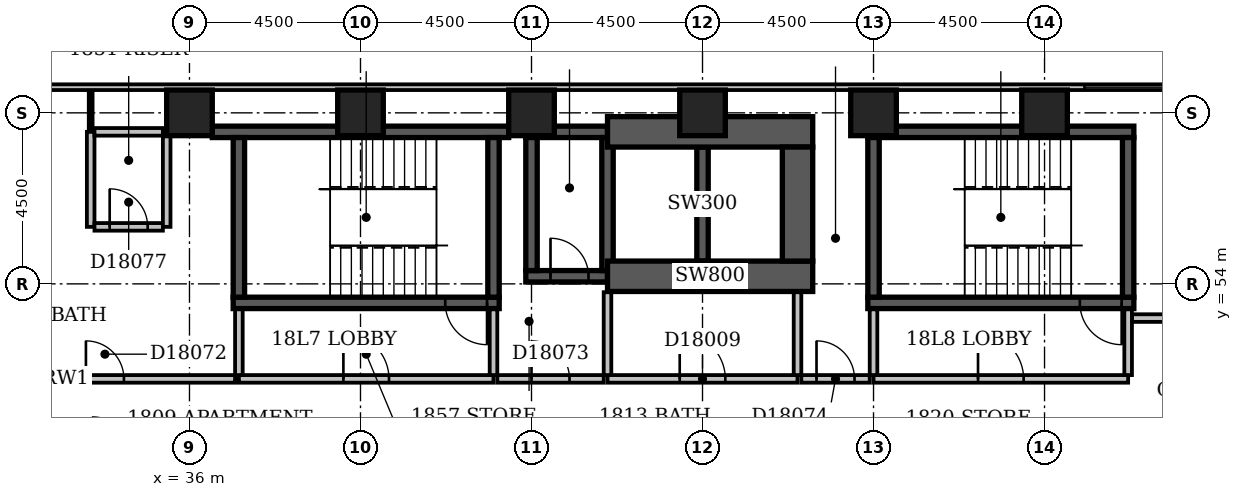
"""IFC4 building model, lengths in metres.
Left out: names, types, materials, properties, quantities, classifications, styles, units other than length and angle.
Written with IfcOpenShell. Run it as: python <this file> out.ifc"""

import sys

from ifc_helpers import new_model, si_unit, direction, frame, frame_2d, origin, origin_2d, place, context, subcontext, project, spatial, rectangle, extrude, element, fill, save


model = new_model("IFC4")
c1 = context("Model", 3, precision=1e-05, world=origin(), true_north=direction((0.0, 1.0)))
c2 = subcontext(c1, "Body", "Model", "MODEL_VIEW")
j1 = project(units=[si_unit("LENGTHUNIT", "METRE"), si_unit("PLANEANGLEUNIT", "RADIAN")], contexts=[c1])
p1 = place(None, origin())
s1 = spatial("IfcSite", under=j1, at=p1, CompositionType="ELEMENT")
p2 = place(p1, origin())
s2 = spatial("IfcBuilding", under=s1, at=p2, CompositionType="ELEMENT")
p3 = place(p2, frame((0.0, 0.0, 75.8)))
s3 = spatial("IfcBuildingStorey", under=s2, at=p3, CompositionType="ELEMENT", Elevation=75.8)
p4 = place(p3, frame((36.6, 58.0, -0.3), z_axis=(0.0, 0.0, 1.0), x_axis=(1.0, 0.0, 0.0)))
e1 = element("IfcWall", 1, at=p4, inside=s3, PredefinedType="SHEAR", context=c2, shape_type="SweptSolid", body=[
    extrude(rectangle(XDim=7.8, YDim=0.3, at=frame_2d((3.9, 0.0))), origin(), (0.0, 0.0, 1.0), 3.6),
])
p5 = place(p3, frame((37.15, 53.5, -0.3), z_axis=(0.0, 0.0, 1.0), x_axis=(1.0, 0.0, 0.0)))
e2 = element("IfcWall", 2, at=p5, inside=s3, PredefinedType="SHEAR", context=c2, shape_type="SweptSolid", body=[
    extrude(rectangle(XDim=7.0, YDim=0.3, at=frame_2d((3.5, 0.0))), origin(), (0.0, 0.0, 1.0), 3.6),
])
p6 = place(p5, frame((5.58, 0.0, 0.3)))
e3 = element("IfcOpeningElement", 3, at=p6, cuts=e2, PredefinedType="OPENING", context=c2, shape_type="SweptSolid", body=[
    extrude(rectangle(XDim=1.1, YDim=2.1, at=frame_2d((0.55, 1.05))), frame((0.0, 0.162, 0.0), z_axis=(0.0, -1.0, 0.0), x_axis=(1.0, 0.0, 0.0)), (0.0, 0.0, 1.0), 0.324),
])
for number, where, z_axis, x_axis in (
    (4, (37.3, 53.65, -0.3), (0.0, 0.0, 1.0), (0.0, 1.0, 0.0)),
    (5, (44.0, 53.65, -0.3), (0.0, 0.0, 1.0), (0.0, 1.0, 0.0)),
):
    element("IfcWall", number, at=place(p3, frame(where, z_axis=z_axis, x_axis=x_axis)), inside=s3, PredefinedType="SHEAR", context=c2, shape_type="SweptSolid", body=[
        extrude(rectangle(XDim=4.2, YDim=0.3, at=frame_2d((2.1, 0.0))), origin(), (0.0, 0.0, 1.0), 3.6),
    ])
p7 = place(p3, frame((44.85, 54.2, -0.3), z_axis=(0.0, 0.0, 1.0), x_axis=(1.0, 0.0, 0.0)))
e6 = element("IfcWall", 6, at=p7, inside=s3, PredefinedType="SHEAR", context=c2, shape_type="SweptSolid", body=[
    extrude(rectangle(XDim=2.15, YDim=0.3, at=frame_2d((1.075, 0.0))), origin(), (0.0, 0.0, 1.0), 3.6),
])
p8 = place(p7, frame((0.65, 0.0, 0.3)))
e7 = element("IfcOpeningElement", 7, at=p8, cuts=e6, PredefinedType="OPENING", context=c2, shape_type="SweptSolid", body=[
    extrude(rectangle(XDim=1.0, YDim=2.1, at=frame_2d((0.5, 1.05))), frame((0.0, 0.162, 0.0), z_axis=(0.0, -1.0, 0.0), x_axis=(1.0, 0.0, 0.0)), (0.0, 0.0, 1.0), 0.324),
])
p9 = place(p3, frame((44.85, 58.0, -0.3), z_axis=(0.0, 0.0, 1.0), x_axis=(1.0, 0.0, 0.0)))
e8 = element("IfcWall", 8, at=p9, inside=s3, PredefinedType="SHEAR", context=c2, shape_type="SweptSolid", body=[
    extrude(rectangle(XDim=2.15, YDim=0.3, at=frame_2d((1.075, 0.0))), origin(), (0.0, 0.0, 1.0), 3.6),
])
p10 = place(p3, frame((45.0, 54.35, -0.3), z_axis=(0.0, 0.0, 1.0), x_axis=(0.0, 1.0, 0.0)))
e9 = element("IfcWall", 9, at=p10, inside=s3, PredefinedType="SHEAR", context=c2, shape_type="SweptSolid", body=[
    extrude(rectangle(XDim=3.5, YDim=0.3, at=frame_2d((1.75, 0.0))), origin(), (0.0, 0.0, 1.0), 3.6),
])
p11 = place(p3, frame((47.0, 54.2, -0.3), z_axis=(0.0, 0.0, 1.0), x_axis=(1.0, 0.0, 0.0)))
e10 = element("IfcWall", 10, at=p11, inside=s3, PredefinedType="SHEAR", context=c2, shape_type="SweptSolid", body=[
    extrude(rectangle(XDim=5.4, YDim=0.8, at=frame_2d((2.7, 0.0))), origin(), (0.0, 0.0, 1.0), 3.6),
])
p12 = place(p3, frame((47.0, 54.35, -0.3), z_axis=(0.0, 0.0, 1.0), x_axis=(0.0, 1.0, 0.0)))
e11 = element("IfcWall", 11, at=p12, inside=s3, PredefinedType="SHEAR", context=c2, shape_type="SweptSolid", body=[
    extrude(rectangle(XDim=3.5, YDim=0.3, at=frame_2d((1.75, 0.0))), origin(), (0.0, 0.0, 1.0), 3.6),
])
p13 = place(p3, frame((47.0, 58.0, -0.3), z_axis=(0.0, 0.0, 1.0), x_axis=(1.0, 0.0, 0.0)))
e12 = element("IfcWall", 12, at=p13, inside=s3, PredefinedType="SHEAR", context=c2, shape_type="SweptSolid", body=[
    extrude(rectangle(XDim=5.4, YDim=0.8, at=frame_2d((2.7, 0.0))), origin(), (0.0, 0.0, 1.0), 3.6),
])
p14 = place(p3, frame((49.5, 54.6, -0.3), z_axis=(0.0, 0.0, 1.0), x_axis=(0.0, 1.0, 0.0)))
e13 = element("IfcWall", 13, at=p14, inside=s3, PredefinedType="SHEAR", context=c2, shape_type="SweptSolid", body=[
    extrude(rectangle(XDim=3.0, YDim=0.3, at=frame_2d((1.5, 0.0))), origin(), (0.0, 0.0, 1.0), 3.6),
])
p15 = place(p3, frame((52.0, 54.6, -0.3), z_axis=(0.0, 0.0, 1.0), x_axis=(0.0, 1.0, 0.0)))
e14 = element("IfcWall", 14, at=p15, inside=s3, PredefinedType="SHEAR", context=c2, shape_type="SweptSolid", body=[
    extrude(rectangle(XDim=3.0, YDim=0.8, at=frame_2d((1.5, 0.0))), origin(), (0.0, 0.0, 1.0), 3.6),
])
p16 = place(p3, frame((53.85, 53.5, -0.3), z_axis=(0.0, 0.0, 1.0), x_axis=(1.0, 0.0, 0.0)))
e15 = element("IfcWall", 15, at=p16, inside=s3, PredefinedType="SHEAR", context=c2, shape_type="SweptSolid", body=[
    extrude(rectangle(XDim=7.0, YDim=0.3, at=frame_2d((3.5, 0.0))), origin(), (0.0, 0.0, 1.0), 3.6),
])
p17 = place(p16, frame((5.58, 0.0, 0.3)))
e16 = element("IfcOpeningElement", 16, at=p17, cuts=e15, PredefinedType="OPENING", context=c2, shape_type="SweptSolid", body=[
    extrude(rectangle(XDim=1.1, YDim=2.1, at=frame_2d((0.55, 1.05))), frame((0.0, 0.162, 0.0), z_axis=(0.0, -1.0, 0.0), x_axis=(1.0, 0.0, 0.0)), (0.0, 0.0, 1.0), 0.324),
])
p18 = place(p3, frame((53.85, 58.0, -0.3), z_axis=(0.0, 0.0, 1.0), x_axis=(1.0, 0.0, 0.0)))
e17 = element("IfcWall", 17, at=p18, inside=s3, PredefinedType="SHEAR", context=c2, shape_type="SweptSolid", body=[
    extrude(rectangle(XDim=7.0, YDim=0.3, at=frame_2d((3.5, 0.0))), origin(), (0.0, 0.0, 1.0), 3.6),
])
for number, where, z_axis, x_axis in (
    (18, (54.0, 53.65, -0.3), (0.0, 0.0, 1.0), (0.0, 1.0, 0.0)),
    (19, (60.7, 53.65, -0.3), (0.0, 0.0, 1.0), (0.0, 1.0, 0.0)),
):
    element("IfcWall", number, at=place(p3, frame(where, z_axis=z_axis, x_axis=x_axis)), inside=s3, PredefinedType="SHEAR", context=c2, shape_type="SweptSolid", body=[
        extrude(rectangle(XDim=4.2, YDim=0.3, at=frame_2d((2.1, 0.0))), origin(), (0.0, 0.0, 1.0), 3.6),
    ])
for number, where, z_axis, x_axis in (
    (20, (36.0, 58.5, -0.3), (0.0, 0.0, 1.0), (1.0, 0.0, 0.0)),
    (21, (40.5, 58.5, -0.3), (0.0, 0.0, 1.0), (1.0, 0.0, 0.0)),
    (22, (45.0, 58.5, -0.3), (0.0, 0.0, 1.0), (1.0, 0.0, 0.0)),
    (23, (49.5, 58.5, -0.3), (0.0, 0.0, 1.0), (1.0, 0.0, 0.0)),
    (24, (54.0, 58.5, -0.3), (0.0, 0.0, 1.0), (1.0, 0.0, 0.0)),
    (25, (58.5, 58.5, -0.3), (0.0, 0.0, 1.0), (1.0, 0.0, 0.0)),
):
    element("IfcColumn", number, at=place(p3, frame(where, z_axis=z_axis, x_axis=x_axis)), inside=s3, PredefinedType="COLUMN", context=c2, shape_type="SweptSolid", body=[
        extrude(rectangle(XDim=1.2, YDim=1.2, at=origin_2d()), origin(), (0.0, 0.0, 1.0), 3.6),
    ])
p19 = place(p3, frame((68.1, 59.175, 0.0), z_axis=(0.0, 0.0, 1.0), x_axis=(-1.0, 0.0, 0.0)))
e26 = element("IfcWall", 26, at=p19, inside=s3, PredefinedType="STANDARD", context=c2, shape_type="SweptSolid", body=[
    extrude(rectangle(XDim=68.85, YDim=0.15, at=frame_2d((34.425, 0.0))), origin(), (0.0, 0.0, 1.0), 2.7),
])
p20 = place(p19, frame((1.65, 0.0, 0.6)))
e27 = element("IfcOpeningElement", 27, at=p20, cuts=e26, PredefinedType="OPENING", context=c2, shape_type="SweptSolid", body=[
    extrude(rectangle(XDim=2.4, YDim=1.8, at=frame_2d((1.2, 0.9))), frame((0.0, 0.087, 0.0), z_axis=(0.0, -1.0, 0.0), x_axis=(1.0, 0.0, 0.0)), (0.0, 0.0, 1.0), 0.174),
])
p21 = place(p19, frame((6.15, 0.0, 0.6)))
e28 = element("IfcOpeningElement", 28, at=p21, cuts=e26, PredefinedType="OPENING", context=c2, shape_type="SweptSolid", body=[
    extrude(rectangle(XDim=2.4, YDim=1.8, at=frame_2d((1.2, 0.9))), frame((0.0, 0.087, 0.0), z_axis=(0.0, -1.0, 0.0), x_axis=(1.0, 0.0, 0.0)), (0.0, 0.0, 1.0), 0.174),
])
p22 = place(p19, frame((38.49, 0.0, 0.6)))
e29 = element("IfcOpeningElement", 29, at=p22, cuts=e26, PredefinedType="OPENING", context=c2, shape_type="SweptSolid", body=[
    extrude(rectangle(XDim=1.8, YDim=1.8, at=frame_2d((0.9, 0.9))), frame((0.0, 0.087, 0.0), z_axis=(0.0, -1.0, 0.0), x_axis=(1.0, 0.0, 0.0)), (0.0, 0.0, 1.0), 0.174),
])
p23 = place(p3, frame((47.0, 51.5, 0.0), z_axis=(0.0, 0.0, 1.0), x_axis=(1.0, 0.0, 0.0)))
e30 = element("IfcWall", 30, at=p23, inside=s3, PredefinedType="PARTITIONING", context=c2, shape_type="SweptSolid", body=[
    extrude(rectangle(XDim=5.0, YDim=0.2, at=frame_2d((2.5, 0.0))), origin(), (0.0, 0.0, 1.0), 3.3),
])
p24 = place(p23, frame((1.9, 0.0, 0.0)))
e31 = element("IfcOpeningElement", 31, at=p24, cuts=e30, PredefinedType="OPENING", context=c2, shape_type="SweptSolid", body=[
    extrude(rectangle(XDim=1.2, YDim=2.1, at=frame_2d((0.6, 1.05))), frame((0.0, 0.112, 0.0), z_axis=(0.0, -1.0, 0.0), x_axis=(1.0, 0.0, 0.0)), (0.0, 0.0, 1.0), 0.224),
])
for number, where, z_axis, x_axis in (
    (32, (52.0, 51.6, 0.0), (0.0, 0.0, 1.0), (0.0, 1.0, 0.0)),
    (33, (47.0, 51.6, 0.0), (0.0, 0.0, 1.0), (0.0, 1.0, 0.0)),
):
    element("IfcWall", number, at=place(p3, frame(where, z_axis=z_axis, x_axis=x_axis)), inside=s3, PredefinedType="PARTITIONING", context=c2, shape_type="SweptSolid", body=[
        extrude(rectangle(XDim=2.18, YDim=0.2, at=frame_2d((1.09, 0.0))), origin(), (0.0, 0.0, 1.0), 3.3),
    ])
p25 = place(p3, frame((37.3, 51.5, 0.0), z_axis=(0.0, 0.0, 1.0), x_axis=(1.0, 0.0, 0.0)))
e34 = element("IfcWall", 34, at=p25, inside=s3, PredefinedType="PARTITIONING", context=c2, shape_type="SweptSolid", body=[
    extrude(rectangle(XDim=6.7, YDim=0.2, at=frame_2d((3.35, 0.0))), origin(), (0.0, 0.0, 1.0), 3.3),
])
p26 = place(p25, frame((2.75, 0.0, 0.0)))
e35 = element("IfcOpeningElement", 35, at=p26, cuts=e34, PredefinedType="OPENING", context=c2, shape_type="SweptSolid", body=[
    extrude(rectangle(XDim=1.2, YDim=2.1, at=frame_2d((0.6, 1.05))), frame((0.0, 0.112, 0.0), z_axis=(0.0, -1.0, 0.0), x_axis=(1.0, 0.0, 0.0)), (0.0, 0.0, 1.0), 0.224),
])
for number, where, z_axis, x_axis in (
    (36, (44.0, 51.6, 0.0), (0.0, 0.0, 1.0), (0.0, 1.0, 0.0)),
    (37, (37.3, 51.6, 0.0), (0.0, 0.0, 1.0), (0.0, 1.0, 0.0)),
):
    element("IfcWall", number, at=place(p3, frame(where, z_axis=z_axis, x_axis=x_axis)), inside=s3, PredefinedType="PARTITIONING", context=c2, shape_type="SweptSolid", body=[
        extrude(rectangle(XDim=1.73, YDim=0.2, at=frame_2d((0.865, 0.0))), origin(), (0.0, 0.0, 1.0), 3.3),
    ])
p27 = place(p3, frame((54.0, 51.5, 0.0), z_axis=(0.0, 0.0, 1.0), x_axis=(1.0, 0.0, 0.0)))
e38 = element("IfcWall", 38, at=p27, inside=s3, PredefinedType="PARTITIONING", context=c2, shape_type="SweptSolid", body=[
    extrude(rectangle(XDim=6.7, YDim=0.2, at=frame_2d((3.35, 0.0))), origin(), (0.0, 0.0, 1.0), 3.3),
])
p28 = place(p27, frame((2.75, 0.0, 0.0)))
e39 = element("IfcOpeningElement", 39, at=p28, cuts=e38, PredefinedType="OPENING", context=c2, shape_type="SweptSolid", body=[
    extrude(rectangle(XDim=1.2, YDim=2.1, at=frame_2d((0.6, 1.05))), frame((0.0, 0.112, 0.0), z_axis=(0.0, -1.0, 0.0), x_axis=(1.0, 0.0, 0.0)), (0.0, 0.0, 1.0), 0.224),
])
p29 = place(p3, frame((60.7, 51.6, 0.0), z_axis=(0.0, 0.0, 1.0), x_axis=(0.0, 1.0, 0.0)))
e40 = element("IfcWall", 40, at=p29, inside=s3, PredefinedType="PARTITIONING", context=c2, shape_type="SweptSolid", body=[
    extrude(rectangle(XDim=1.73, YDim=0.2, at=frame_2d((0.865, 0.0))), origin(), (0.0, 0.0, 1.0), 3.3),
])
p30 = place(p3, frame((54.0, 51.6, 0.0), z_axis=(0.0, 0.0, 1.0), x_axis=(0.0, 1.0, 0.0)))
e41 = element("IfcWall", 41, at=p30, inside=s3, PredefinedType="PARTITIONING", context=c2, shape_type="SweptSolid", body=[
    extrude(rectangle(XDim=1.73, YDim=0.2, at=frame_2d((0.865, 0.0))), origin(), (0.0, 0.0, 1.0), 2.6),
])
p31 = place(p3, frame((27.9, 51.5, 0.0), z_axis=(0.0, 0.0, 1.0), x_axis=(1.0, 0.0, 0.0)))
e42 = element("IfcWall", 42, at=p31, inside=s3, PredefinedType="PARTITIONING", context=c2, shape_type="SweptSolid", body=[
    extrude(rectangle(XDim=9.3, YDim=0.2, at=frame_2d((4.65, 0.0))), origin(), (0.0, 0.0, 1.0), 3.3),
])
p32 = place(p31, frame((0.675, 0.0, 0.0)))
e43 = element("IfcOpeningElement", 43, at=p32, cuts=e42, PredefinedType="OPENING", context=c2, shape_type="SweptSolid", body=[
    extrude(rectangle(XDim=0.9, YDim=2.1, at=frame_2d((0.45, 1.05))), frame((0.0, 0.112, 0.0), z_axis=(0.0, -1.0, 0.0), x_axis=(1.0, 0.0, 0.0)), (0.0, 0.0, 1.0), 0.224),
])
p33 = place(p31, frame((5.375, 0.0, 0.0)))
e44 = element("IfcOpeningElement", 44, at=p33, cuts=e42, PredefinedType="OPENING", context=c2, shape_type="SweptSolid", body=[
    extrude(rectangle(XDim=1.0, YDim=2.1, at=frame_2d((0.5, 1.05))), frame((0.0, 0.112, 0.0), z_axis=(0.0, -1.0, 0.0), x_axis=(1.0, 0.0, 0.0)), (0.0, 0.0, 1.0), 0.224),
])
p34 = place(p3, frame((44.1, 51.5, 0.0), z_axis=(0.0, 0.0, 1.0), x_axis=(1.0, 0.0, 0.0)))
e45 = element("IfcWall", 45, at=p34, inside=s3, PredefinedType="PARTITIONING", context=c2, shape_type="SweptSolid", body=[
    extrude(rectangle(XDim=2.8, YDim=0.2, at=frame_2d((1.4, 0.0))), origin(), (0.0, 0.0, 1.0), 3.3),
])
p35 = place(p34, frame((0.9, 0.0, 0.0)))
e46 = element("IfcOpeningElement", 46, at=p35, cuts=e45, PredefinedType="OPENING", context=c2, shape_type="SweptSolid", body=[
    extrude(rectangle(XDim=1.0, YDim=2.1, at=frame_2d((0.5, 1.05))), frame((0.0, 0.112, 0.0), z_axis=(0.0, -1.0, 0.0), x_axis=(1.0, 0.0, 0.0)), (0.0, 0.0, 1.0), 0.224),
])
p36 = place(p3, frame((52.1, 51.5, 0.0), z_axis=(0.0, 0.0, 1.0), x_axis=(1.0, 0.0, 0.0)))
e47 = element("IfcWall", 47, at=p36, inside=s3, PredefinedType="PARTITIONING", context=c2, shape_type="SweptSolid", body=[
    extrude(rectangle(XDim=1.8, YDim=0.2, at=frame_2d((0.9, 0.0))), origin(), (0.0, 0.0, 1.0), 3.3),
])
p37 = place(p36, frame((0.4, 0.0, 0.0)))
e48 = element("IfcOpeningElement", 48, at=p37, cuts=e47, PredefinedType="OPENING", context=c2, shape_type="SweptSolid", body=[
    extrude(rectangle(XDim=1.0, YDim=2.1, at=frame_2d((0.5, 1.05))), frame((0.0, 0.112, 0.0), z_axis=(0.0, -1.0, 0.0), x_axis=(1.0, 0.0, 0.0)), (0.0, 0.0, 1.0), 0.224),
])
p38 = place(p3, frame((60.8, 53.1, 0.0), z_axis=(0.0, 0.0, 1.0), x_axis=(1.0, 0.0, 0.0)))
e49 = element("IfcWall", 49, at=p38, inside=s3, PredefinedType="PARTITIONING", context=c2, shape_type="SweptSolid", body=[
    extrude(rectangle(XDim=7.3, YDim=0.2, at=frame_2d((3.65, 0.0))), origin(), (0.0, 0.0, 1.0), 3.3),
])
p39 = place(p38, frame((2.85, 0.0, 0.0)))
e50 = element("IfcOpeningElement", 50, at=p39, cuts=e49, PredefinedType="OPENING", context=c2, shape_type="SweptSolid", body=[
    extrude(rectangle(XDim=0.9, YDim=2.1, at=frame_2d((0.45, 1.05))), frame((0.0, 0.112, 0.0), z_axis=(0.0, -1.0, 0.0), x_axis=(1.0, 0.0, 0.0)), (0.0, 0.0, 1.0), 0.224),
])
p40 = place(p3, frame((33.4, 55.5, 0.0), z_axis=(0.0, 0.0, 1.0), x_axis=(0.0, 1.0, 0.0)))
e51 = element("IfcWall", 51, at=p40, inside=s3, PredefinedType="PARTITIONING", context=c2, shape_type="SweptSolid", body=[
    extrude(rectangle(XDim=2.5, YDim=0.2, at=frame_2d((1.25, 0.0))), origin(), (0.0, 0.0, 1.0), 3.3),
])
p41 = place(p3, frame((33.5, 55.5, 0.0), z_axis=(0.0, 0.0, 1.0), x_axis=(1.0, 0.0, 0.0)))
e52 = element("IfcWall", 52, at=p41, inside=s3, PredefinedType="PARTITIONING", context=c2, shape_type="SweptSolid", body=[
    extrude(rectangle(XDim=1.8, YDim=0.2, at=frame_2d((0.9, 0.0))), origin(), (0.0, 0.0, 1.0), 3.3),
])
p42 = place(p41, frame((0.4, 0.0, 0.0)))
e53 = element("IfcOpeningElement", 53, at=p42, cuts=e52, PredefinedType="OPENING", context=c2, shape_type="SweptSolid", body=[
    extrude(rectangle(XDim=1.0, YDim=2.1, at=frame_2d((0.5, 1.05))), frame((0.0, 0.112, 0.0), z_axis=(0.0, -1.0, 0.0), x_axis=(1.0, 0.0, 0.0)), (0.0, 0.0, 1.0), 0.224),
])
p43 = place(p3, frame((35.4, 55.5, 0.0), z_axis=(0.0, 0.0, 1.0), x_axis=(0.0, 1.0, 0.0)))
e54 = element("IfcWall", 54, at=p43, inside=s3, PredefinedType="PARTITIONING", context=c2, shape_type="SweptSolid", body=[
    extrude(rectangle(XDim=2.5, YDim=0.2, at=frame_2d((1.25, 0.0))), origin(), (0.0, 0.0, 1.0), 2.4),
])
p44 = place(p3, frame((33.4, 58.0, 0.0), z_axis=(0.0, 0.0, 1.0), x_axis=(0.0, 1.0, 0.0)))
e55 = element("IfcWall", 55, at=p44, inside=s3, PredefinedType="PARTITIONING", context=c2, shape_type="SweptSolid", body=[
    extrude(rectangle(XDim=1.1, YDim=0.1, at=frame_2d((0.55, 0.0))), origin(), (0.0, 0.0, 1.0), 3.3),
])
p45 = place(p3, frame((33.5, 58.0, 0.0), z_axis=(0.0, 0.0, 1.0), x_axis=(1.0, 0.0, 0.0)))
e56 = element("IfcWall", 56, at=p45, inside=s3, PredefinedType="PARTITIONING", context=c2, shape_type="SweptSolid", body=[
    extrude(rectangle(XDim=1.8, YDim=0.2, at=frame_2d((0.9, 0.0))), origin(), (0.0, 0.0, 1.0), 3.3),
])
p46 = place(p21, origin())
e57 = element("IfcWindow", 57, at=p46, inside=s3, PartitioningType="SINGLE_PANEL", PredefinedType="WINDOW", context=c2, shape_type="SweptSolid", body=[
    extrude(rectangle(XDim=2.4, YDim=1.8, at=frame_2d((1.2, 0.9))), frame((0.0, 0.03, 0.0), z_axis=(0.0, -1.0, 0.0), x_axis=(1.0, 0.0, 0.0)), (0.0, 0.0, 1.0), 0.06),
])
fill(e28, e57)
p47 = place(p26, origin())
e58 = element("IfcDoor", 58, at=p47, inside=s3, OperationType="SINGLE_SWING_LEFT", PredefinedType="DOOR", context=c2, shape_type="SweptSolid", body=[
    extrude(rectangle(XDim=1.2, YDim=2.1, at=frame_2d((0.6, 1.05))), frame((0.0, 0.025, 0.0), z_axis=(0.0, -1.0, 0.0), x_axis=(1.0, 0.0, 0.0)), (0.0, 0.0, 1.0), 0.05),
])
fill(e35, e58)
p48 = place(p28, origin())
e59 = element("IfcDoor", 59, at=p48, inside=s3, OperationType="SINGLE_SWING_LEFT", PredefinedType="DOOR", context=c2, shape_type="SweptSolid", body=[
    extrude(rectangle(XDim=1.2, YDim=2.1, at=frame_2d((0.6, 1.05))), frame((0.0, 0.025, 0.0), z_axis=(0.0, -1.0, 0.0), x_axis=(1.0, 0.0, 0.0)), (0.0, 0.0, 1.0), 0.05),
])
fill(e39, e59)
p49 = place(p24, origin())
e60 = element("IfcDoor", 60, at=p49, inside=s3, OperationType="SINGLE_SWING_LEFT", PredefinedType="DOOR", context=c2, shape_type="SweptSolid", body=[
    extrude(rectangle(XDim=1.2, YDim=2.1, at=frame_2d((0.6, 1.05))), frame((0.0, 0.025, 0.0), z_axis=(0.0, -1.0, 0.0), x_axis=(1.0, 0.0, 0.0)), (0.0, 0.0, 1.0), 0.05),
])
fill(e31, e60)
p50 = place(p8, origin())
e61 = element("IfcDoor", 61, at=p50, inside=s3, OperationType="SINGLE_SWING_LEFT", PredefinedType="DOOR", context=c2, shape_type="SweptSolid", body=[
    extrude(rectangle(XDim=1.0, YDim=2.1, at=frame_2d((0.5, 1.05))), frame((0.0, 0.025, 0.0), z_axis=(0.0, -1.0, 0.0), x_axis=(1.0, 0.0, 0.0)), (0.0, 0.0, 1.0), 0.05),
])
fill(e7, e61)
p51 = place(p6, origin())
e62 = element("IfcDoor", 62, at=p51, inside=s3, OperationType="SINGLE_SWING_RIGHT", PredefinedType="DOOR", context=c2, shape_type="SweptSolid", body=[
    extrude(rectangle(XDim=1.1, YDim=2.1, at=frame_2d((0.55, 1.05))), frame((0.0, 0.025, 0.0), z_axis=(0.0, -1.0, 0.0), x_axis=(1.0, 0.0, 0.0)), (0.0, 0.0, 1.0), 0.05),
])
fill(e3, e62)
p52 = place(p17, origin())
e63 = element("IfcDoor", 63, at=p52, inside=s3, OperationType="SINGLE_SWING_RIGHT", PredefinedType="DOOR", context=c2, shape_type="SweptSolid", body=[
    extrude(rectangle(XDim=1.1, YDim=2.1, at=frame_2d((0.55, 1.05))), frame((0.0, 0.025, 0.0), z_axis=(0.0, -1.0, 0.0), x_axis=(1.0, 0.0, 0.0)), (0.0, 0.0, 1.0), 0.05),
])
fill(e16, e63)
p53 = place(p33, origin())
e64 = element("IfcDoor", 64, at=p53, inside=s3, OperationType="SINGLE_SWING_LEFT", PredefinedType="DOOR", context=c2, shape_type="SweptSolid", body=[
    extrude(rectangle(XDim=1.0, YDim=2.1, at=frame_2d((0.5, 1.05))), frame((0.0, 0.025, 0.0), z_axis=(0.0, -1.0, 0.0), x_axis=(1.0, 0.0, 0.0)), (0.0, 0.0, 1.0), 0.05),
])
fill(e44, e64)
p54 = place(p35, origin())
e65 = element("IfcDoor", 65, at=p54, inside=s3, OperationType="SINGLE_SWING_LEFT", PredefinedType="DOOR", context=c2, shape_type="SweptSolid", body=[
    extrude(rectangle(XDim=1.0, YDim=2.1, at=frame_2d((0.5, 1.05))), frame((0.0, 0.025, 0.0), z_axis=(0.0, -1.0, 0.0), x_axis=(1.0, 0.0, 0.0)), (0.0, 0.0, 1.0), 0.05),
])
fill(e46, e65)
p55 = place(p37, origin())
e66 = element("IfcDoor", 66, at=p55, inside=s3, OperationType="SINGLE_SWING_LEFT", PredefinedType="DOOR", context=c2, shape_type="SweptSolid", body=[
    extrude(rectangle(XDim=1.0, YDim=2.1, at=frame_2d((0.5, 1.05))), frame((0.0, 0.025, 0.0), z_axis=(0.0, -1.0, 0.0), x_axis=(1.0, 0.0, 0.0)), (0.0, 0.0, 1.0), 0.05),
])
fill(e48, e66)
p56 = place(p42, origin())
e67 = element("IfcDoor", 67, at=p56, inside=s3, OperationType="SINGLE_SWING_LEFT", PredefinedType="DOOR", context=c2, shape_type="SweptSolid", body=[
    extrude(rectangle(XDim=1.0, YDim=2.1, at=frame_2d((0.5, 1.05))), frame((0.0, 0.025, 0.0), z_axis=(0.0, -1.0, 0.0), x_axis=(1.0, 0.0, 0.0)), (0.0, 0.0, 1.0), 0.05),
])
fill(e53, e67)
save(model, sys.argv[1])
